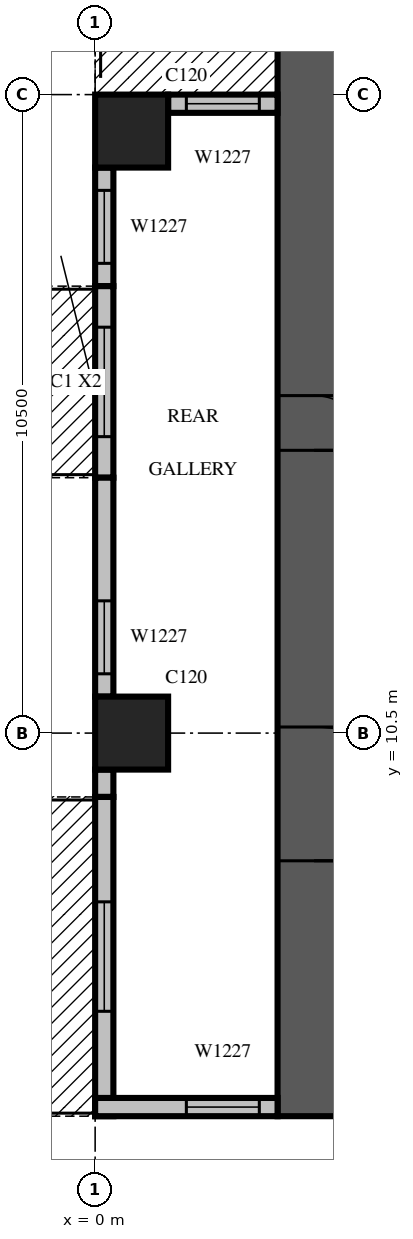
"""IFC4 building model, lengths in metres.
Left out: names, types, materials, properties, quantities, classifications, styles, units other than length and angle.
Written with IfcOpenShell. Run it as: python <this file> out.ifc"""

import sys

from ifc_helpers import new_model, si_unit, direction, frame, frame_2d, origin, origin_2d, place, context, subcontext, project, spatial, rectangle, extrude, source, transform, mapped, element, fill, save


model = new_model("IFC4")
c1 = context("Model", 3, precision=1e-05, world=origin(), true_north=direction((0.0, 1.0)))
c2 = subcontext(c1, "Body", "Model", "MODEL_VIEW")
j1 = project(units=[si_unit("LENGTHUNIT", "METRE"), si_unit("PLANEANGLEUNIT", "RADIAN")], contexts=[c1])
p1 = place(None, origin())
s1 = spatial("IfcSite", under=j1, at=p1, CompositionType="ELEMENT")
p2 = place(p1, origin())
s2 = spatial("IfcBuilding", under=s1, at=p2, CompositionType="ELEMENT")
p3 = place(p2, frame((0.0, 0.0, 99.3)))
s3 = spatial("IfcBuildingStorey", under=s2, at=p3, CompositionType="ELEMENT", Elevation=99.3)
m1 = source(origin(), c2, "Body", "SweptSolid", [
    extrude(rectangle(XDim=1.2, YDim=1.2, at=origin_2d()), origin(), (0.0, 0.0, 1.0), 4.2),
])
for number, where, z_axis, x_axis in (
    (1, (0.6, 10.5, 0.0), (0.0, 0.0, 1.0), (1.0, 0.0, 0.0)),
    (2, (0.6, 20.4, 0.0), (0.0, 0.0, 1.0), (1.0, 0.0, 0.0)),
):
    element("IfcColumn", number, at=place(p3, frame(where, z_axis=z_axis, x_axis=x_axis)), inside=s3, PredefinedType="COLUMN", context=c2, shape_type="MappedRepresentation", body=[
        mapped(m1, transform((0.0, 0.0, 0.0), scale=1.0)),
    ])
m2 = source(origin(), c2, "Body", "SweptSolid", [
    extrude(rectangle(XDim=18.0, YDim=1.2, at=frame_2d((9.0, 0.0))), origin(), (0.0, 0.0, 1.0), 4.2),
])
p4 = place(p3, frame((3.6, 4.2, 0.0), z_axis=(0.0, 0.0, 1.0), x_axis=(0.0, 1.0, 0.0)))
e3 = element("IfcWall", 3, at=p4, inside=s3, PredefinedType="SHEAR", context=c2, shape_type="MappedRepresentation", body=[
    mapped(m2, transform((0.0, 0.0, 0.0), scale=1.0)),
])
m3 = source(origin(), c2, "Body", "SweptSolid", [
    extrude(rectangle(XDim=2.2, YDim=2.1, at=frame_2d((1.1, 1.05))), frame((0.0, 0.61, 0.0), z_axis=(0.0, -1.0, 0.0), x_axis=(1.0, 0.0, 0.0)), (0.0, 0.0, 1.0), 1.22),
])
p5 = place(p4, frame((4.2, 0.0, 0.0)))
e4 = element("IfcOpeningElement", 4, at=p5, cuts=e3, PredefinedType="OPENING", context=c2, shape_type="MappedRepresentation", body=[
    mapped(m3, transform((0.0, 0.0, 0.0), scale=1.0)),
])
p6 = place(p4, frame((10.95, 0.0, 0.0)))
e5 = element("IfcOpeningElement", 5, at=p6, cuts=e3, PredefinedType="OPENING", context=c2, shape_type="SweptSolid", body=[
    extrude(rectangle(XDim=0.9, YDim=2.1, at=frame_2d((0.45, 1.05))), frame((0.0, 0.61, 0.0), z_axis=(0.0, -1.0, 0.0), x_axis=(1.0, 0.0, 0.0)), (0.0, 0.0, 1.0), 1.22),
])
m4 = source(origin(), c2, "Body", "SweptSolid", [
    extrude(rectangle(XDim=1.8, YDim=0.3, at=frame_2d((0.9, 0.0))), origin(), (0.0, 0.0, 1.0), 3.8),
])
p7 = place(p3, frame((3.0, 20.85, 0.0), z_axis=(0.0, 0.0, 1.0), x_axis=(-1.0, 0.0, 0.0)))
e6 = element("IfcWall", 6, at=p7, inside=s3, PredefinedType="STANDARD", context=c2, shape_type="MappedRepresentation", body=[
    mapped(m4, transform((0.0, 0.0, 0.0), scale=1.0)),
])
m5 = source(origin(), c2, "Body", "SweptSolid", [
    extrude(rectangle(XDim=1.2, YDim=2.7, at=frame_2d((0.6, 1.35))), frame((0.0, 0.16, 0.0), z_axis=(0.0, -1.0, 0.0), x_axis=(1.0, 0.0, 0.0)), (0.0, 0.0, 1.0), 0.32),
])
p8 = place(p7, frame((0.3, 0.0, 0.6)))
e7 = element("IfcOpeningElement", 7, at=p8, cuts=e6, PredefinedType="OPENING", context=c2, shape_type="MappedRepresentation", body=[
    mapped(m5, transform((0.0, 0.0, 0.0), scale=1.0)),
])
m6 = source(origin(), c2, "Body", "SweptSolid", [
    extrude(rectangle(XDim=1.95, YDim=0.3, at=frame_2d((0.975, 0.0))), origin(), (0.0, 0.0, 1.0), 3.8),
])
p9 = place(p3, frame((0.15, 19.8, 0.0), z_axis=(0.0, 0.0, 1.0), x_axis=(0.0, -1.0, 0.0)))
e8 = element("IfcWall", 8, at=p9, inside=s3, PredefinedType="STANDARD", context=c2, shape_type="MappedRepresentation", body=[
    mapped(m6, transform((0.0, 0.0, 0.0), scale=1.0)),
])
p10 = place(p9, frame((0.375, 0.0, 0.6)))
e9 = element("IfcOpeningElement", 9, at=p10, cuts=e8, PredefinedType="OPENING", context=c2, shape_type="MappedRepresentation", body=[
    mapped(m5, transform((0.0, 0.0, 0.0), scale=1.0)),
])
m7 = source(origin(), c2, "Body", "SweptSolid", [
    extrude(rectangle(XDim=3.15, YDim=0.3, at=frame_2d((1.575, 0.0))), origin(), (0.0, 0.0, 1.0), 3.8),
])
p11 = place(p3, frame((0.15, 17.85, 0.0), z_axis=(0.0, 0.0, 1.0), x_axis=(0.0, -1.0, 0.0)))
e10 = element("IfcWall", 10, at=p11, inside=s3, PredefinedType="STANDARD", context=c2, shape_type="MappedRepresentation", body=[
    mapped(m7, transform((0.0, 0.0, 0.0), scale=1.0)),
])
m8 = source(origin(), c2, "Body", "SweptSolid", [
    extrude(rectangle(XDim=1.8, YDim=2.4, at=frame_2d((0.9, 1.2))), frame((0.0, 0.16, 0.0), z_axis=(0.0, -1.0, 0.0), x_axis=(1.0, 0.0, 0.0)), (0.0, 0.0, 1.0), 0.32),
])
p12 = place(p11, frame((0.675, 0.0, 0.0)))
e11 = element("IfcOpeningElement", 11, at=p12, cuts=e10, PredefinedType="OPENING", context=c2, shape_type="MappedRepresentation", body=[
    mapped(m8, transform((0.0, 0.0, 0.0), scale=1.0)),
])
m9 = source(origin(), c2, "Body", "SweptSolid", [
    extrude(rectangle(XDim=3.6, YDim=0.3, at=frame_2d((1.8, 0.0))), origin(), (0.0, 0.0, 1.0), 3.8),
])
p13 = place(p3, frame((0.15, 14.7, 0.0), z_axis=(0.0, 0.0, 1.0), x_axis=(0.0, -1.0, 0.0)))
e12 = element("IfcWall", 12, at=p13, inside=s3, PredefinedType="STANDARD", context=c2, shape_type="MappedRepresentation", body=[
    mapped(m9, transform((0.0, 0.0, 0.0), scale=1.0)),
])
p14 = place(p13, frame((2.025, 0.0, 0.6)))
e13 = element("IfcOpeningElement", 13, at=p14, cuts=e12, PredefinedType="OPENING", context=c2, shape_type="MappedRepresentation", body=[
    mapped(m5, transform((0.0, 0.0, 0.0), scale=1.0)),
])
p15 = place(p3, frame((0.15, 9.9, 0.0), z_axis=(0.0, 0.0, 1.0), x_axis=(0.0, -1.0, 0.0)))
e14 = element("IfcWall", 14, at=p15, inside=s3, PredefinedType="STANDARD", context=c2, shape_type="SweptSolid", body=[
    extrude(rectangle(XDim=0.45, YDim=0.3, at=frame_2d((0.225, 0.0))), origin(), (0.0, 0.0, 1.0), 3.8),
])
p16 = place(p3, frame((0.15, 9.45, 0.0), z_axis=(0.0, 0.0, 1.0), x_axis=(0.0, -1.0, 0.0)))
e15 = element("IfcWall", 15, at=p16, inside=s3, PredefinedType="STANDARD", context=c2, shape_type="SweptSolid", body=[
    extrude(rectangle(XDim=5.25, YDim=0.3, at=frame_2d((2.625, 0.0))), origin(), (0.0, 0.0, 1.0), 3.8),
])
p17 = place(p16, frame((1.725, 0.0, 0.0)))
e16 = element("IfcOpeningElement", 16, at=p17, cuts=e15, PredefinedType="OPENING", context=c2, shape_type="MappedRepresentation", body=[
    mapped(m8, transform((0.0, 0.0, 0.0), scale=1.0)),
])
m10 = source(origin(), c2, "Body", "SweptSolid", [
    extrude(rectangle(XDim=3.0, YDim=0.3, at=frame_2d((1.5, 0.0))), origin(), (0.0, 0.0, 1.0), 3.8),
])
p18 = place(p3, frame((0.0, 4.35, 0.0), z_axis=(0.0, 0.0, 1.0), x_axis=(1.0, 0.0, 0.0)))
e17 = element("IfcWall", 17, at=p18, inside=s3, PredefinedType="STANDARD", context=c2, shape_type="MappedRepresentation", body=[
    mapped(m10, transform((0.0, 0.0, 0.0), scale=1.0)),
])
p19 = place(p18, frame((1.5, 0.0, 0.6)))
e18 = element("IfcOpeningElement", 18, at=p19, cuts=e17, PredefinedType="OPENING", context=c2, shape_type="MappedRepresentation", body=[
    mapped(m5, transform((0.0, 0.0, 0.0), scale=1.0)),
])
m11 = source(origin(), c2, "Body", "SweptSolid", [
    extrude(rectangle(XDim=1.2, YDim=2.7, at=frame_2d((0.6, 1.35))), frame((0.0, 0.03, 0.0), z_axis=(0.0, -1.0, 0.0), x_axis=(1.0, 0.0, 0.0)), (0.0, 0.0, 1.0), 0.06),
])
p20 = place(p8, origin())
e19 = element("IfcWindow", 19, at=p20, inside=s3, PartitioningType="SINGLE_PANEL", PredefinedType="WINDOW", context=c2, shape_type="MappedRepresentation", body=[
    mapped(m11, transform((0.0, 0.0, 0.0), scale=1.0)),
])
fill(e7, e19)
p21 = place(p10, origin())
e20 = element("IfcWindow", 20, at=p21, inside=s3, PartitioningType="SINGLE_PANEL", PredefinedType="WINDOW", context=c2, shape_type="MappedRepresentation", body=[
    mapped(m11, transform((0.0, 0.0, 0.0), scale=1.0)),
])
fill(e9, e20)
m12 = source(origin(), c2, "Body", "SweptSolid", [
    extrude(rectangle(XDim=1.8, YDim=2.4, at=frame_2d((0.9, 1.2))), frame((0.0, 0.025, 0.0), z_axis=(0.0, -1.0, 0.0), x_axis=(1.0, 0.0, 0.0)), (0.0, 0.0, 1.0), 0.05),
])
p22 = place(p12, origin())
e21 = element("IfcDoor", 21, at=p22, inside=s3, OperationType="SLIDING_TO_LEFT", PredefinedType="DOOR", context=c2, shape_type="MappedRepresentation", body=[
    mapped(m12, transform((0.0, 0.0, 0.0), scale=1.0)),
])
fill(e11, e21)
p23 = place(p14, origin())
e22 = element("IfcWindow", 22, at=p23, inside=s3, PartitioningType="SINGLE_PANEL", PredefinedType="WINDOW", context=c2, shape_type="MappedRepresentation", body=[
    mapped(m11, transform((0.0, 0.0, 0.0), scale=1.0)),
])
fill(e13, e22)
p24 = place(p17, origin())
e23 = element("IfcDoor", 23, at=p24, inside=s3, OperationType="SLIDING_TO_LEFT", PredefinedType="DOOR", context=c2, shape_type="MappedRepresentation", body=[
    mapped(m12, transform((0.0, 0.0, 0.0), scale=1.0)),
])
fill(e16, e23)
p25 = place(p19, origin())
e24 = element("IfcWindow", 24, at=p25, inside=s3, PartitioningType="SINGLE_PANEL", PredefinedType="WINDOW", context=c2, shape_type="MappedRepresentation", body=[
    mapped(m11, transform((0.0, 0.0, 0.0), scale=1.0)),
])
fill(e18, e24)
m13 = source(origin(), c2, "Body", "SweptSolid", [
    extrude(rectangle(XDim=2.2, YDim=2.1, at=frame_2d((1.1, 1.05))), frame((0.0, 0.025, 0.0), z_axis=(0.0, -1.0, 0.0), x_axis=(1.0, 0.0, 0.0)), (0.0, 0.0, 1.0), 0.05),
])
p26 = place(p5, origin())
e25 = element("IfcDoor", 25, at=p26, inside=s3, OperationType="DOUBLE_DOOR_SINGLE_SWING", PredefinedType="DOOR", context=c2, shape_type="MappedRepresentation", body=[
    mapped(m13, transform((0.0, 0.0, 0.0), scale=1.0)),
])
fill(e4, e25)
m14 = source(origin(), c2, "Body", "SweptSolid", [
    extrude(rectangle(XDim=0.9, YDim=2.1, at=frame_2d((0.45, 1.05))), frame((0.0, 0.025, 0.0), z_axis=(0.0, -1.0, 0.0), x_axis=(1.0, 0.0, 0.0)), (0.0, 0.0, 1.0), 0.05),
])
p27 = place(p6, origin())
e26 = element("IfcDoor", 26, at=p27, inside=s3, OperationType="SINGLE_SWING_RIGHT", PredefinedType="DOOR", context=c2, shape_type="MappedRepresentation", body=[
    mapped(m14, transform((0.0, 0.0, 0.0), scale=1.0)),
])
fill(e5, e26)
save(model, sys.argv[1])
